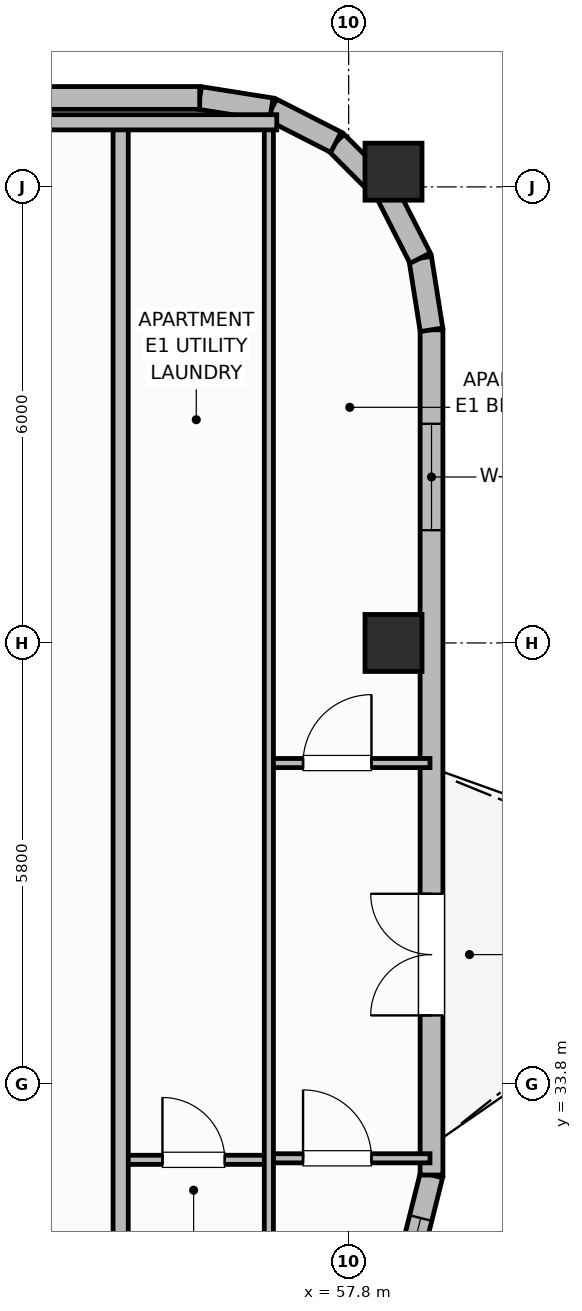
"""IFC4 building model, lengths in metres.
Left out: names, types, materials, properties, quantities, classifications, styles, units other than length and angle.
Written with IfcOpenShell. Run it as: python <this file> out.ifc"""

import sys

from ifc_helpers import new_model, si_unit, direction, frame, frame_2d, origin, origin_2d, place, context, subcontext, project, spatial, rectangle, extrude, element, fill, save


model = new_model("IFC4")
c1 = context("Model", 3, precision=1e-05, world=origin(), true_north=direction((0.0, 1.0)))
c2 = subcontext(c1, "Body", "Model", "MODEL_VIEW")
j1 = project(units=[si_unit("LENGTHUNIT", "METRE"), si_unit("PLANEANGLEUNIT", "RADIAN")], contexts=[c1])
p1 = place(None, origin())
s1 = spatial("IfcSite", under=j1, at=p1, CompositionType="ELEMENT")
p2 = place(p1, origin())
s2 = spatial("IfcBuilding", under=s1, at=p2, CompositionType="ELEMENT")
p3 = place(p2, frame((0.0, 0.0, 260.2)))
s3 = spatial("IfcBuildingStorey", under=s2, at=p3, CompositionType="ELEMENT", Elevation=260.2)
for number, where, z_axis, x_axis in (
    (1, (58.39, 39.6, 0.0), (0.0, 0.0, 1.0), (1.0, 0.0, 0.0)),
    (2, (58.39, 45.8, 0.0), (0.0, 0.0, 1.0), (1.0, 0.0, 0.0)),
):
    element("IfcColumn", number, at=place(p3, frame(where, z_axis=z_axis, x_axis=x_axis)), inside=s3, PredefinedType="COLUMN", context=c2, shape_type="SweptSolid", body=[
        extrude(rectangle(XDim=0.75, YDim=0.75, at=origin_2d()), origin(), (0.0, 0.0, 1.0), 3.7),
    ])
p4 = place(p3, frame((58.34, 30.4, 0.0), z_axis=(0.0, 0.0, 1.0), x_axis=(0.242434303349, 0.970167824946, 0.0)))
e3 = element("IfcWall", 3, at=p4, inside=s3, PredefinedType="SOLIDWALL", context=c2, shape_type="SweptSolid", body=[
    extrude(rectangle(XDim=2.268, YDim=0.3, at=frame_2d((1.134, 0.0))), origin(), (0.0, 0.0, 1.0), 2.73),
])
p5 = place(p4, frame((0.584, 0.0, 0.92)))
e4 = element("IfcOpeningElement", 4, at=p5, cuts=e3, PredefinedType="OPENING", context=c2, shape_type="SweptSolid", body=[
    extrude(rectangle(XDim=1.1, YDim=1.65, at=frame_2d((0.55, 0.825))), frame((0.0, 0.16, 0.0), z_axis=(0.0, -1.0, 0.0), x_axis=(1.0, 0.0, 0.0)), (0.0, 0.0, 1.0), 0.32),
])
p6 = place(p3, frame((58.89, 32.6, 0.0), z_axis=(0.0, 0.0, 1.0), x_axis=(0.0, 1.0, 0.0)))
e5 = element("IfcWall", 5, at=p6, inside=s3, PredefinedType="SOLIDWALL", context=c2, shape_type="SweptSolid", body=[
    extrude(rectangle(XDim=11.12, YDim=0.3, at=frame_2d((5.56, 0.0))), origin(), (0.0, 0.0, 1.0), 2.73),
])
p7 = place(p6, frame((2.1, 0.0, 0.0)))
e6 = element("IfcOpeningElement", 6, at=p7, cuts=e5, PredefinedType="OPENING", context=c2, shape_type="SweptSolid", body=[
    extrude(rectangle(XDim=1.6, YDim=2.1, at=frame_2d((0.8, 1.05))), frame((0.0, 0.16, 0.0), z_axis=(0.0, -1.0, 0.0), x_axis=(1.0, 0.0, 0.0)), (0.0, 0.0, 1.0), 0.32),
])
p8 = place(p6, frame((8.483, 0.0, 0.76)))
e7 = element("IfcOpeningElement", 7, at=p8, cuts=e5, PredefinedType="OPENING", context=c2, shape_type="SweptSolid", body=[
    extrude(rectangle(XDim=1.4, YDim=1.85, at=frame_2d((0.7, 0.925))), frame((0.0, 0.16, 0.0), z_axis=(0.0, -1.0, 0.0), x_axis=(1.0, 0.0, 0.0)), (0.0, 0.0, 1.0), 0.32),
])
p9 = place(p3, frame((58.89, 43.72, 0.0), z_axis=(0.0, 0.0, 1.0), x_axis=(-0.156304114255, 0.987708977314, 0.0)))
e8 = element("IfcWall", 8, at=p9, inside=s3, PredefinedType="SOLIDWALL", context=c2, shape_type="SweptSolid", body=[
    extrude(rectangle(XDim=0.954, YDim=0.3, at=frame_2d((0.477, 0.0))), origin(), (0.0, 0.0, 1.0), 2.73),
])
p10 = place(p3, frame((58.741, 44.663, 0.0), z_axis=(0.0, 0.0, 1.0), x_axis=(-0.45395644796, 0.891023873617, 0.0)))
e9 = element("IfcWall", 9, at=p10, inside=s3, PredefinedType="SOLIDWALL", context=c2, shape_type="SweptSolid", body=[
    extrude(rectangle(XDim=0.954, YDim=0.3, at=frame_2d((0.477, 0.0))), origin(), (0.0, 0.0, 1.0), 2.73),
])
for number, where, z_axis, x_axis in (
    (10, (58.308, 45.513, 0.0), (0.0, 0.0, 1.0), (-0.707, 0.707, 0.0)),
    (11, (57.633, 46.188, 0.0), (0.0, 0.0, 1.0), (-0.891, 0.454, 0.0)),
):
    element("IfcWall", number, at=place(p3, frame(where, z_axis=z_axis, x_axis=x_axis)), inside=s3, PredefinedType="SOLIDWALL", context=c2, shape_type="SweptSolid", body=[
        extrude(rectangle(XDim=0.954, YDim=0.3, at=frame_2d((0.477, 0.0))), origin(), (0.0, 0.0, 1.0), 2.73),
    ])
p11 = place(p3, frame((56.782, 46.621, 0.0), z_axis=(0.0, 0.0, 1.0), x_axis=(-0.987663181641, 0.156593229835, 0.0)))
e12 = element("IfcWall", 12, at=p11, inside=s3, PredefinedType="SOLIDWALL", context=c2, shape_type="SweptSolid", body=[
    extrude(rectangle(XDim=0.954, YDim=0.3, at=frame_2d((0.477, 0.0))), origin(), (0.0, 0.0, 1.0), 2.73),
])
p12 = place(p3, frame((55.84, 46.77, 0.0), z_axis=(0.0, 0.0, 1.0), x_axis=(-1.0, 0.0, 0.0)))
e13 = element("IfcWall", 13, at=p12, inside=s3, PredefinedType="SOLIDWALL", context=c2, shape_type="SweptSolid", body=[
    extrude(rectangle(XDim=33.28, YDim=0.3, at=frame_2d((16.64, 0.0))), origin(), (0.0, 0.0, 1.0), 2.73),
])
p13 = place(p12, frame((4.461, 0.0, 0.95)))
e14 = element("IfcOpeningElement", 14, at=p13, cuts=e13, PredefinedType="OPENING", context=c2, shape_type="SweptSolid", body=[
    extrude(rectangle(XDim=1.1, YDim=1.65, at=frame_2d((0.55, 0.825))), frame((0.0, 0.16, 0.0), z_axis=(0.0, -1.0, 0.0), x_axis=(1.0, 0.0, 0.0)), (0.0, 0.0, 1.0), 0.32),
])
p14 = place(p12, frame((7.368, 0.0, 0.95)))
e15 = element("IfcOpeningElement", 15, at=p14, cuts=e13, PredefinedType="OPENING", context=c2, shape_type="SweptSolid", body=[
    extrude(rectangle(XDim=1.1, YDim=1.65, at=frame_2d((0.55, 0.825))), frame((0.0, 0.16, 0.0), z_axis=(0.0, -1.0, 0.0), x_axis=(1.0, 0.0, 0.0)), (0.0, 0.0, 1.0), 0.32),
])
p15 = place(p12, frame((10.275, 0.0, 0.95)))
e16 = element("IfcOpeningElement", 16, at=p15, cuts=e13, PredefinedType="OPENING", context=c2, shape_type="SweptSolid", body=[
    extrude(rectangle(XDim=1.1, YDim=1.65, at=frame_2d((0.55, 0.825))), frame((0.0, 0.16, 0.0), z_axis=(0.0, -1.0, 0.0), x_axis=(1.0, 0.0, 0.0)), (0.0, 0.0, 1.0), 0.32),
])
p16 = place(p12, frame((13.883, 0.0, 0.95)))
e17 = element("IfcOpeningElement", 17, at=p16, cuts=e13, PredefinedType="OPENING", context=c2, shape_type="SweptSolid", body=[
    extrude(rectangle(XDim=1.1, YDim=1.65, at=frame_2d((0.55, 0.825))), frame((0.0, 0.16, 0.0), z_axis=(0.0, -1.0, 0.0), x_axis=(1.0, 0.0, 0.0)), (0.0, 0.0, 1.0), 0.32),
])
p17 = place(p12, frame((16.09, 0.0, 0.95)))
e18 = element("IfcOpeningElement", 18, at=p17, cuts=e13, PredefinedType="OPENING", context=c2, shape_type="SweptSolid", body=[
    extrude(rectangle(XDim=1.1, YDim=1.65, at=frame_2d((0.55, 0.825))), frame((0.0, 0.16, 0.0), z_axis=(0.0, -1.0, 0.0), x_axis=(1.0, 0.0, 0.0)), (0.0, 0.0, 1.0), 0.32),
])
p18 = place(p12, frame((18.297, 0.0, 0.95)))
e19 = element("IfcOpeningElement", 19, at=p18, cuts=e13, PredefinedType="OPENING", context=c2, shape_type="SweptSolid", body=[
    extrude(rectangle(XDim=1.1, YDim=1.65, at=frame_2d((0.55, 0.825))), frame((0.0, 0.16, 0.0), z_axis=(0.0, -1.0, 0.0), x_axis=(1.0, 0.0, 0.0)), (0.0, 0.0, 1.0), 0.32),
])
p19 = place(p12, frame((21.905, 0.0, 0.95)))
e20 = element("IfcOpeningElement", 20, at=p19, cuts=e13, PredefinedType="OPENING", context=c2, shape_type="SweptSolid", body=[
    extrude(rectangle(XDim=1.1, YDim=1.65, at=frame_2d((0.55, 0.825))), frame((0.0, 0.16, 0.0), z_axis=(0.0, -1.0, 0.0), x_axis=(1.0, 0.0, 0.0)), (0.0, 0.0, 1.0), 0.32),
])
p20 = place(p12, frame((24.812, 0.0, 0.95)))
e21 = element("IfcOpeningElement", 21, at=p20, cuts=e13, PredefinedType="OPENING", context=c2, shape_type="SweptSolid", body=[
    extrude(rectangle(XDim=1.1, YDim=1.65, at=frame_2d((0.55, 0.825))), frame((0.0, 0.16, 0.0), z_axis=(0.0, -1.0, 0.0), x_axis=(1.0, 0.0, 0.0)), (0.0, 0.0, 1.0), 0.32),
])
p21 = place(p12, frame((27.719, 0.0, 0.95)))
e22 = element("IfcOpeningElement", 22, at=p21, cuts=e13, PredefinedType="OPENING", context=c2, shape_type="SweptSolid", body=[
    extrude(rectangle(XDim=1.1, YDim=1.65, at=frame_2d((0.55, 0.825))), frame((0.0, 0.16, 0.0), z_axis=(0.0, -1.0, 0.0), x_axis=(1.0, 0.0, 0.0)), (0.0, 0.0, 1.0), 0.32),
])
p22 = place(p3, frame((54.8, 32.8, 0.0), z_axis=(0.0, 0.0, 1.0), x_axis=(1.0, 0.0, 0.0)))
e23 = element("IfcWall", 23, at=p22, inside=s3, PredefinedType="PARTITIONING", context=c2, shape_type="SweptSolid", body=[
    extrude(rectangle(XDim=1.95, YDim=0.12, at=frame_2d((0.975, 0.0))), origin(), (0.0, 0.0, 1.0), 2.56),
])
p23 = place(p22, frame((0.55, 0.0, 0.0)))
e24 = element("IfcOpeningElement", 24, at=p23, cuts=e23, PredefinedType="OPENING", context=c2, shape_type="SweptSolid", body=[
    extrude(rectangle(XDim=0.82, YDim=2.08, at=frame_2d((0.41, 1.04))), frame((0.0, 0.07, 0.0), z_axis=(0.0, -1.0, 0.0), x_axis=(1.0, 0.0, 0.0)), (0.0, 0.0, 1.0), 0.14),
])
p24 = place(p3, frame((56.75, 32.82, 0.0), z_axis=(0.0, 0.0, 1.0), x_axis=(1.0, 0.0, 0.0)))
e25 = element("IfcWall", 25, at=p24, inside=s3, PredefinedType="PARTITIONING", context=c2, shape_type="SweptSolid", body=[
    extrude(rectangle(XDim=2.12, YDim=0.12, at=frame_2d((1.06, 0.0))), origin(), (0.0, 0.0, 1.0), 2.56),
])
p25 = place(p24, frame((0.45, 0.0, 0.0)))
e26 = element("IfcOpeningElement", 26, at=p25, cuts=e25, PredefinedType="OPENING", context=c2, shape_type="SweptSolid", body=[
    extrude(rectangle(XDim=0.9, YDim=2.1, at=frame_2d((0.45, 1.05))), frame((0.0, 0.07, 0.0), z_axis=(0.0, -1.0, 0.0), x_axis=(1.0, 0.0, 0.0)), (0.0, 0.0, 1.0), 0.14),
])
p26 = place(p3, frame((56.75, 38.02, 0.0), z_axis=(0.0, 0.0, 1.0), x_axis=(1.0, 0.0, 0.0)))
e27 = element("IfcWall", 27, at=p26, inside=s3, PredefinedType="PARTITIONING", context=c2, shape_type="SweptSolid", body=[
    extrude(rectangle(XDim=2.12, YDim=0.12, at=frame_2d((1.06, 0.0))), origin(), (0.0, 0.0, 1.0), 2.56),
])
p27 = place(p26, frame((0.45, 0.0, 0.0)))
e28 = element("IfcOpeningElement", 28, at=p27, cuts=e27, PredefinedType="OPENING", context=c2, shape_type="SweptSolid", body=[
    extrude(rectangle(XDim=0.9, YDim=2.1, at=frame_2d((0.45, 1.05))), frame((0.0, 0.07, 0.0), z_axis=(0.0, -1.0, 0.0), x_axis=(1.0, 0.0, 0.0)), (0.0, 0.0, 1.0), 0.14),
])
p28 = place(p3, frame((56.75, 9.99, 0.0), z_axis=(0.0, 0.0, 1.0), x_axis=(0.0, 1.0, 0.0)))
e29 = element("IfcWall", 29, at=p28, inside=s3, PredefinedType="PARTITIONING", context=c2, shape_type="SweptSolid", body=[
    extrude(rectangle(XDim=36.42, YDim=0.12, at=frame_2d((18.21, 0.0))), origin(), (0.0, 0.0, 1.0), 2.56),
])
p29 = place(p28, frame((0.41, 0.0, 0.0)))
e30 = element("IfcOpeningElement", 30, at=p29, cuts=e29, PredefinedType="OPENING", context=c2, shape_type="SweptSolid", body=[
    extrude(rectangle(XDim=0.9, YDim=2.1, at=frame_2d((0.45, 1.05))), frame((0.0, 0.07, 0.0), z_axis=(0.0, -1.0, 0.0), x_axis=(1.0, 0.0, 0.0)), (0.0, 0.0, 1.0), 0.14),
])
p30 = place(p28, frame((15.56, 0.0, 0.0)))
e31 = element("IfcOpeningElement", 31, at=p30, cuts=e29, PredefinedType="OPENING", context=c2, shape_type="SweptSolid", body=[
    extrude(rectangle(XDim=0.82, YDim=2.08, at=frame_2d((0.41, 1.04))), frame((0.0, 0.07, 0.0), z_axis=(0.0, -1.0, 0.0), x_axis=(1.0, 0.0, 0.0)), (0.0, 0.0, 1.0), 0.14),
])
p31 = place(p3, frame((54.8, 9.95, 0.0), z_axis=(0.0, 0.0, 1.0), x_axis=(0.0, 1.0, 0.0)))
e32 = element("IfcWall", 32, at=p31, inside=s3, PredefinedType="PARTITIONING", context=c2, shape_type="SweptSolid", body=[
    extrude(rectangle(XDim=36.5, YDim=0.2, at=frame_2d((18.25, 0.0))), origin(), (0.0, 0.0, 1.0), 2.56),
])
p32 = place(p31, frame((3.25, 0.0, 0.0)))
e33 = element("IfcOpeningElement", 33, at=p32, cuts=e32, PredefinedType="OPENING", context=c2, shape_type="SweptSolid", body=[
    extrude(rectangle(XDim=1.0, YDim=2.15, at=frame_2d((0.5, 1.075))), frame((0.0, 0.11, 0.0), z_axis=(0.0, -1.0, 0.0), x_axis=(1.0, 0.0, 0.0)), (0.0, 0.0, 1.0), 0.22),
])
p33 = place(p3, frame((53.1, 46.45, 0.0), z_axis=(0.0, 0.0, 1.0), x_axis=(1.0, 0.0, 0.0)))
e34 = element("IfcWall", 34, at=p33, inside=s3, PredefinedType="PARTITIONING", context=c2, shape_type="SweptSolid", body=[
    extrude(rectangle(XDim=3.754, YDim=0.2, at=frame_2d((1.877, 0.0))), origin(), (0.0, 0.0, 1.0), 2.56),
])
p34 = place(p5, origin())
e35 = element("IfcWindow", 35, at=p34, inside=s3, PartitioningType="SINGLE_PANEL", PredefinedType="WINDOW", context=c2, shape_type="SweptSolid", body=[
    extrude(rectangle(XDim=1.1, YDim=1.65, at=frame_2d((0.55, 0.825))), frame((0.0, 0.03, 0.0), z_axis=(0.0, -1.0, 0.0), x_axis=(1.0, 0.0, 0.0)), (0.0, 0.0, 1.0), 0.06),
])
fill(e4, e35)
p35 = place(p7, origin())
e36 = element("IfcDoor", 36, at=p35, inside=s3, OperationType="DOUBLE_DOOR_SINGLE_SWING", PredefinedType="DOOR", context=c2, shape_type="SweptSolid", body=[
    extrude(rectangle(XDim=1.6, YDim=2.1, at=frame_2d((0.8, 1.05))), frame((0.0, 0.025, 0.0), z_axis=(0.0, -1.0, 0.0), x_axis=(1.0, 0.0, 0.0)), (0.0, 0.0, 1.0), 0.05),
])
fill(e6, e36)
p36 = place(p8, origin())
e37 = element("IfcWindow", 37, at=p36, inside=s3, PartitioningType="SINGLE_PANEL", PredefinedType="WINDOW", context=c2, shape_type="SweptSolid", body=[
    extrude(rectangle(XDim=1.4, YDim=1.85, at=frame_2d((0.7, 0.925))), frame((0.0, 0.03, 0.0), z_axis=(0.0, -1.0, 0.0), x_axis=(1.0, 0.0, 0.0)), (0.0, 0.0, 1.0), 0.06),
])
fill(e7, e37)
p37 = place(p23, origin())
e38 = element("IfcDoor", 38, at=p37, inside=s3, OperationType="SINGLE_SWING_LEFT", PredefinedType="DOOR", context=c2, shape_type="SweptSolid", body=[
    extrude(rectangle(XDim=0.82, YDim=2.08, at=frame_2d((0.41, 1.04))), frame((0.0, 0.025, 0.0), z_axis=(0.0, -1.0, 0.0), x_axis=(1.0, 0.0, 0.0)), (0.0, 0.0, 1.0), 0.05),
])
fill(e24, e38)
p38 = place(p25, origin())
e39 = element("IfcDoor", 39, at=p38, inside=s3, OperationType="SINGLE_SWING_LEFT", PredefinedType="DOOR", context=c2, shape_type="SweptSolid", body=[
    extrude(rectangle(XDim=0.9, YDim=2.1, at=frame_2d((0.45, 1.05))), frame((0.0, 0.025, 0.0), z_axis=(0.0, -1.0, 0.0), x_axis=(1.0, 0.0, 0.0)), (0.0, 0.0, 1.0), 0.05),
])
fill(e26, e39)
p39 = place(p27, origin())
e40 = element("IfcDoor", 40, at=p39, inside=s3, OperationType="SINGLE_SWING_RIGHT", PredefinedType="DOOR", context=c2, shape_type="SweptSolid", body=[
    extrude(rectangle(XDim=0.9, YDim=2.1, at=frame_2d((0.45, 1.05))), frame((0.0, 0.025, 0.0), z_axis=(0.0, -1.0, 0.0), x_axis=(1.0, 0.0, 0.0)), (0.0, 0.0, 1.0), 0.05),
])
fill(e28, e40)
save(model, sys.argv[1])
